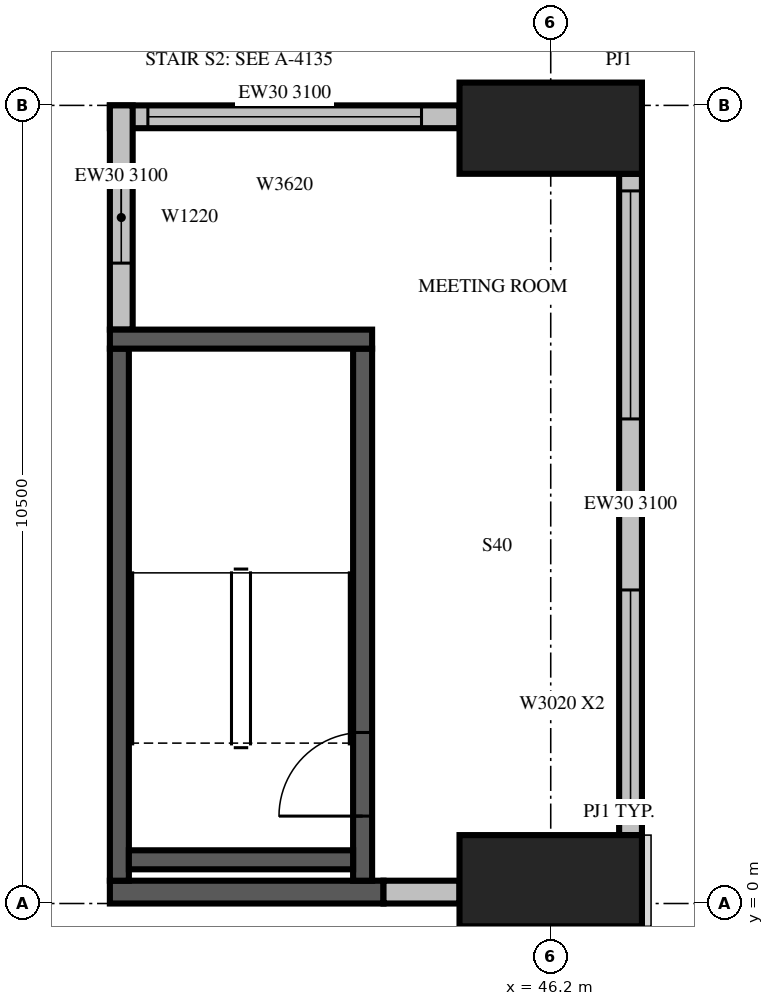
"""IFC4 building model, lengths in metres.
Left out: names, types, materials, properties, quantities, classifications, styles, units other than length and angle.
Written with IfcOpenShell. Run it as: python <this file> out.ifc"""

import sys

from ifc_helpers import new_model, si_unit, direction, frame, frame_2d, origin, origin_2d, place, context, subcontext, project, spatial, rectangle, extrude, source, transform, mapped, element, fill, save


model = new_model("IFC4")
c1 = context("Model", 3, precision=1e-05, world=origin(), true_north=direction((0.0, 1.0)))
c2 = subcontext(c1, "Body", "Model", "MODEL_VIEW")
j1 = project(units=[si_unit("LENGTHUNIT", "METRE"), si_unit("PLANEANGLEUNIT", "RADIAN")], contexts=[c1])
p1 = place(None, origin())
s1 = spatial("IfcSite", under=j1, at=p1, CompositionType="ELEMENT")
p2 = place(p1, origin())
s2 = spatial("IfcBuilding", under=s1, at=p2, CompositionType="ELEMENT")
p3 = place(p2, frame((0.0, 0.0, 344.0)))
s3 = spatial("IfcBuildingStorey", under=s2, at=p3, CompositionType="ELEMENT", Elevation=344.0)
m1 = source(origin(), c2, "Body", "SweptSolid", [
    extrude(rectangle(XDim=2.4, YDim=1.2, at=origin_2d()), origin(), (0.0, 0.0, 1.0), 3.5),
])
for number, where, z_axis, x_axis in (
    (1, (46.2, 0.3, 0.0), (0.0, 0.0, 1.0), (1.0, 0.0, 0.0)),
    (2, (46.2, 10.2, 0.0), (0.0, 0.0, 1.0), (1.0, 0.0, 0.0)),
):
    element("IfcColumn", number, at=place(p3, frame(where, z_axis=z_axis, x_axis=x_axis)), inside=s3, PredefinedType="PILASTER", context=c2, shape_type="MappedRepresentation", body=[
        mapped(m1, transform((0.0, 0.0, 0.0), scale=1.0)),
    ])
m2 = source(origin(), c2, "Body", "SweptSolid", [
    extrude(rectangle(XDim=3.6, YDim=0.3, at=frame_2d((1.8, 0.0))), origin(), (0.0, 0.0, 1.0), 3.1),
])
p4 = place(p3, frame((40.4, 0.15, 0.0), z_axis=(0.0, 0.0, 1.0), x_axis=(1.0, 0.0, 0.0)))
e3 = element("IfcWall", 3, at=p4, inside=s3, PredefinedType="SOLIDWALL", context=c2, shape_type="MappedRepresentation", body=[
    mapped(m2, transform((0.0, 0.0, 0.0), scale=1.0)),
])
m3 = source(origin(), c2, "Body", "SweptSolid", [
    extrude(rectangle(XDim=1.0, YDim=0.3, at=frame_2d((0.5, 0.0))), origin(), (0.0, 0.0, 1.0), 3.1),
])
p5 = place(p3, frame((44.0, 0.15, 0.0), z_axis=(0.0, 0.0, 1.0), x_axis=(1.0, 0.0, 0.0)))
e4 = element("IfcWall", 4, at=p5, inside=s3, PredefinedType="STANDARD", context=c2, shape_type="MappedRepresentation", body=[
    mapped(m3, transform((0.0, 0.0, 0.0), scale=1.0)),
])
m4 = source(origin(), c2, "Body", "SweptSolid", [
    extrude(rectangle(XDim=8.7, YDim=0.3, at=frame_2d((4.35, 0.0))), origin(), (0.0, 0.0, 1.0), 3.1),
])
p6 = place(p3, frame((47.25, 0.9, 0.0), z_axis=(0.0, 0.0, 1.0), x_axis=(0.0, 1.0, 0.0)))
e5 = element("IfcWall", 5, at=p6, inside=s3, PredefinedType="STANDARD", context=c2, shape_type="MappedRepresentation", body=[
    mapped(m4, transform((0.0, 0.0, 0.0), scale=1.0)),
])
m5 = source(origin(), c2, "Body", "SweptSolid", [
    extrude(rectangle(XDim=3.0, YDim=2.0, at=frame_2d((1.5, 1.0))), frame((0.0, 0.16, 0.0), z_axis=(0.0, -1.0, 0.0), x_axis=(1.0, 0.0, 0.0)), (0.0, 0.0, 1.0), 0.32),
])
p7 = place(p6, frame((0.225, 0.0, 0.6)))
e6 = element("IfcOpeningElement", 6, at=p7, cuts=e5, PredefinedType="OPENING", context=c2, shape_type="MappedRepresentation", body=[
    mapped(m5, transform((0.0, 0.0, 0.0), scale=1.0)),
])
p8 = place(p6, frame((5.475, 0.0, 0.6)))
e7 = element("IfcOpeningElement", 7, at=p8, cuts=e5, PredefinedType="OPENING", context=c2, shape_type="MappedRepresentation", body=[
    mapped(m5, transform((0.0, 0.0, 0.0), scale=1.0)),
])
m6 = source(origin(), c2, "Body", "SweptSolid", [
    extrude(rectangle(XDim=4.6, YDim=0.3, at=frame_2d((2.3, 0.0))), origin(), (0.0, 0.0, 1.0), 3.1),
])
p9 = place(p3, frame((45.0, 10.35, 0.0), z_axis=(0.0, 0.0, 1.0), x_axis=(-1.0, 0.0, 0.0)))
e8 = element("IfcWall", 8, at=p9, inside=s3, PredefinedType="STANDARD", context=c2, shape_type="MappedRepresentation", body=[
    mapped(m6, transform((0.0, 0.0, 0.0), scale=1.0)),
])
m7 = source(origin(), c2, "Body", "SweptSolid", [
    extrude(rectangle(XDim=3.6, YDim=2.0, at=frame_2d((1.8, 1.0))), frame((0.0, 0.16, 0.0), z_axis=(0.0, -1.0, 0.0), x_axis=(1.0, 0.0, 0.0)), (0.0, 0.0, 1.0), 0.32),
])
p10 = place(p9, frame((0.5, 0.0, 0.6)))
e9 = element("IfcOpeningElement", 9, at=p10, cuts=e8, PredefinedType="OPENING", context=c2, shape_type="MappedRepresentation", body=[
    mapped(m7, transform((0.0, 0.0, 0.0), scale=1.0)),
])
m8 = source(origin(), c2, "Body", "SweptSolid", [
    extrude(rectangle(XDim=2.95, YDim=0.3, at=frame_2d((1.475, 0.0))), origin(), (0.0, 0.0, 1.0), 3.1),
])
p11 = place(p3, frame((40.55, 10.5, 0.0), z_axis=(0.0, 0.0, 1.0), x_axis=(0.0, -1.0, 0.0)))
e10 = element("IfcWall", 10, at=p11, inside=s3, PredefinedType="STANDARD", context=c2, shape_type="MappedRepresentation", body=[
    mapped(m8, transform((0.0, 0.0, 0.0), scale=1.0)),
])
m9 = source(origin(), c2, "Body", "SweptSolid", [
    extrude(rectangle(XDim=1.2, YDim=2.0, at=frame_2d((0.6, 1.0))), frame((0.0, 0.16, 0.0), z_axis=(0.0, -1.0, 0.0), x_axis=(1.0, 0.0, 0.0)), (0.0, 0.0, 1.0), 0.32),
])
p12 = place(p11, frame((0.875, 0.0, 0.6)))
e11 = element("IfcOpeningElement", 11, at=p12, cuts=e10, PredefinedType="OPENING", context=c2, shape_type="MappedRepresentation", body=[
    mapped(m9, transform((0.0, 0.0, 0.0), scale=1.0)),
])
m10 = source(origin(), c2, "Body", "SweptSolid", [
    extrude(rectangle(XDim=7.0, YDim=0.25, at=frame_2d((3.5, 0.0))), origin(), (0.0, 0.0, 1.0), 3.1),
])
p13 = place(p3, frame((40.525, 0.3, 0.0), z_axis=(0.0, 0.0, 1.0), x_axis=(0.0, 1.0, 0.0)))
e12 = element("IfcWall", 12, at=p13, inside=s3, PredefinedType="SOLIDWALL", context=c2, shape_type="MappedRepresentation", body=[
    mapped(m10, transform((0.0, 0.0, 0.0), scale=1.0)),
])
p14 = place(p3, frame((43.725, 0.3, 0.0), z_axis=(0.0, 0.0, 1.0), x_axis=(0.0, 1.0, 0.0)))
e13 = element("IfcWall", 13, at=p14, inside=s3, PredefinedType="SOLIDWALL", context=c2, shape_type="MappedRepresentation", body=[
    mapped(m10, transform((0.0, 0.0, 0.0), scale=1.0)),
])
m11 = source(origin(), c2, "Body", "SweptSolid", [
    extrude(rectangle(XDim=1.1, YDim=2.1, at=frame_2d((0.55, 1.05))), frame((0.0, 0.135, 0.0), z_axis=(0.0, -1.0, 0.0), x_axis=(1.0, 0.0, 0.0)), (0.0, 0.0, 1.0), 0.27),
])
p15 = place(p14, frame((0.85, 0.0, 0.0)))
e14 = element("IfcOpeningElement", 14, at=p15, cuts=e13, PredefinedType="OPENING", context=c2, shape_type="MappedRepresentation", body=[
    mapped(m11, transform((0.0, 0.0, 0.0), scale=1.0)),
])
m12 = source(origin(), c2, "Body", "SweptSolid", [
    extrude(rectangle(XDim=3.45, YDim=0.25, at=frame_2d((1.725, 0.0))), origin(), (0.0, 0.0, 1.0), 3.1),
])
p16 = place(p3, frame((40.4, 7.425, 0.0), z_axis=(0.0, 0.0, 1.0), x_axis=(1.0, 0.0, 0.0)))
e15 = element("IfcWall", 15, at=p16, inside=s3, PredefinedType="SOLIDWALL", context=c2, shape_type="MappedRepresentation", body=[
    mapped(m12, transform((0.0, 0.0, 0.0), scale=1.0)),
])
m13 = source(origin(), c2, "Body", "SweptSolid", [
    extrude(rectangle(XDim=2.95, YDim=0.25, at=frame_2d((1.475, 0.0))), origin(), (0.0, 0.0, 1.0), 3.1),
])
p17 = place(p3, frame((40.65, 0.575, 0.0), z_axis=(0.0, 0.0, 1.0), x_axis=(1.0, 0.0, 0.0)))
e16 = element("IfcWall", 16, at=p17, inside=s3, PredefinedType="SOLIDWALL", context=c2, shape_type="MappedRepresentation", body=[
    mapped(m13, transform((0.0, 0.0, 0.0), scale=1.0)),
])
m14 = source(origin(), c2, "Body", "SweptSolid", [
    extrude(rectangle(XDim=3.0, YDim=2.0, at=frame_2d((1.5, 1.0))), frame((0.0, 0.03, 0.0), z_axis=(0.0, -1.0, 0.0), x_axis=(1.0, 0.0, 0.0)), (0.0, 0.0, 1.0), 0.06),
])
p18 = place(p7, origin())
e17 = element("IfcWindow", 17, at=p18, inside=s3, PartitioningType="SINGLE_PANEL", PredefinedType="WINDOW", context=c2, shape_type="MappedRepresentation", body=[
    mapped(m14, transform((0.0, 0.0, 0.0), scale=1.0)),
])
fill(e6, e17)
p19 = place(p8, origin())
e18 = element("IfcWindow", 18, at=p19, inside=s3, PartitioningType="SINGLE_PANEL", PredefinedType="WINDOW", context=c2, shape_type="MappedRepresentation", body=[
    mapped(m14, transform((0.0, 0.0, 0.0), scale=1.0)),
])
fill(e7, e18)
m15 = source(origin(), c2, "Body", "SweptSolid", [
    extrude(rectangle(XDim=3.6, YDim=2.0, at=frame_2d((1.8, 1.0))), frame((0.0, 0.03, 0.0), z_axis=(0.0, -1.0, 0.0), x_axis=(1.0, 0.0, 0.0)), (0.0, 0.0, 1.0), 0.06),
])
p20 = place(p10, origin())
e19 = element("IfcWindow", 19, at=p20, inside=s3, PartitioningType="SINGLE_PANEL", PredefinedType="WINDOW", context=c2, shape_type="MappedRepresentation", body=[
    mapped(m15, transform((0.0, 0.0, 0.0), scale=1.0)),
])
fill(e9, e19)
m16 = source(origin(), c2, "Body", "SweptSolid", [
    extrude(rectangle(XDim=1.2, YDim=2.0, at=frame_2d((0.6, 1.0))), frame((0.0, 0.03, 0.0), z_axis=(0.0, -1.0, 0.0), x_axis=(1.0, 0.0, 0.0)), (0.0, 0.0, 1.0), 0.06),
])
p21 = place(p12, origin())
e20 = element("IfcWindow", 20, at=p21, inside=s3, PartitioningType="SINGLE_PANEL", PredefinedType="WINDOW", context=c2, shape_type="MappedRepresentation", body=[
    mapped(m16, transform((0.0, 0.0, 0.0), scale=1.0)),
])
fill(e11, e20)
m17 = source(origin(), c2, "Body", "SweptSolid", [
    extrude(rectangle(XDim=1.1, YDim=2.1, at=frame_2d((0.55, 1.05))), frame((0.0, 0.025, 0.0), z_axis=(0.0, -1.0, 0.0), x_axis=(1.0, 0.0, 0.0)), (0.0, 0.0, 1.0), 0.05),
])
p22 = place(p15, origin())
e21 = element("IfcDoor", 21, at=p22, inside=s3, OperationType="SINGLE_SWING_LEFT", PredefinedType="DOOR", context=c2, shape_type="MappedRepresentation", body=[
    mapped(m17, transform((0.0, 0.0, 0.0), scale=1.0)),
])
fill(e14, e21)
save(model, sys.argv[1])
